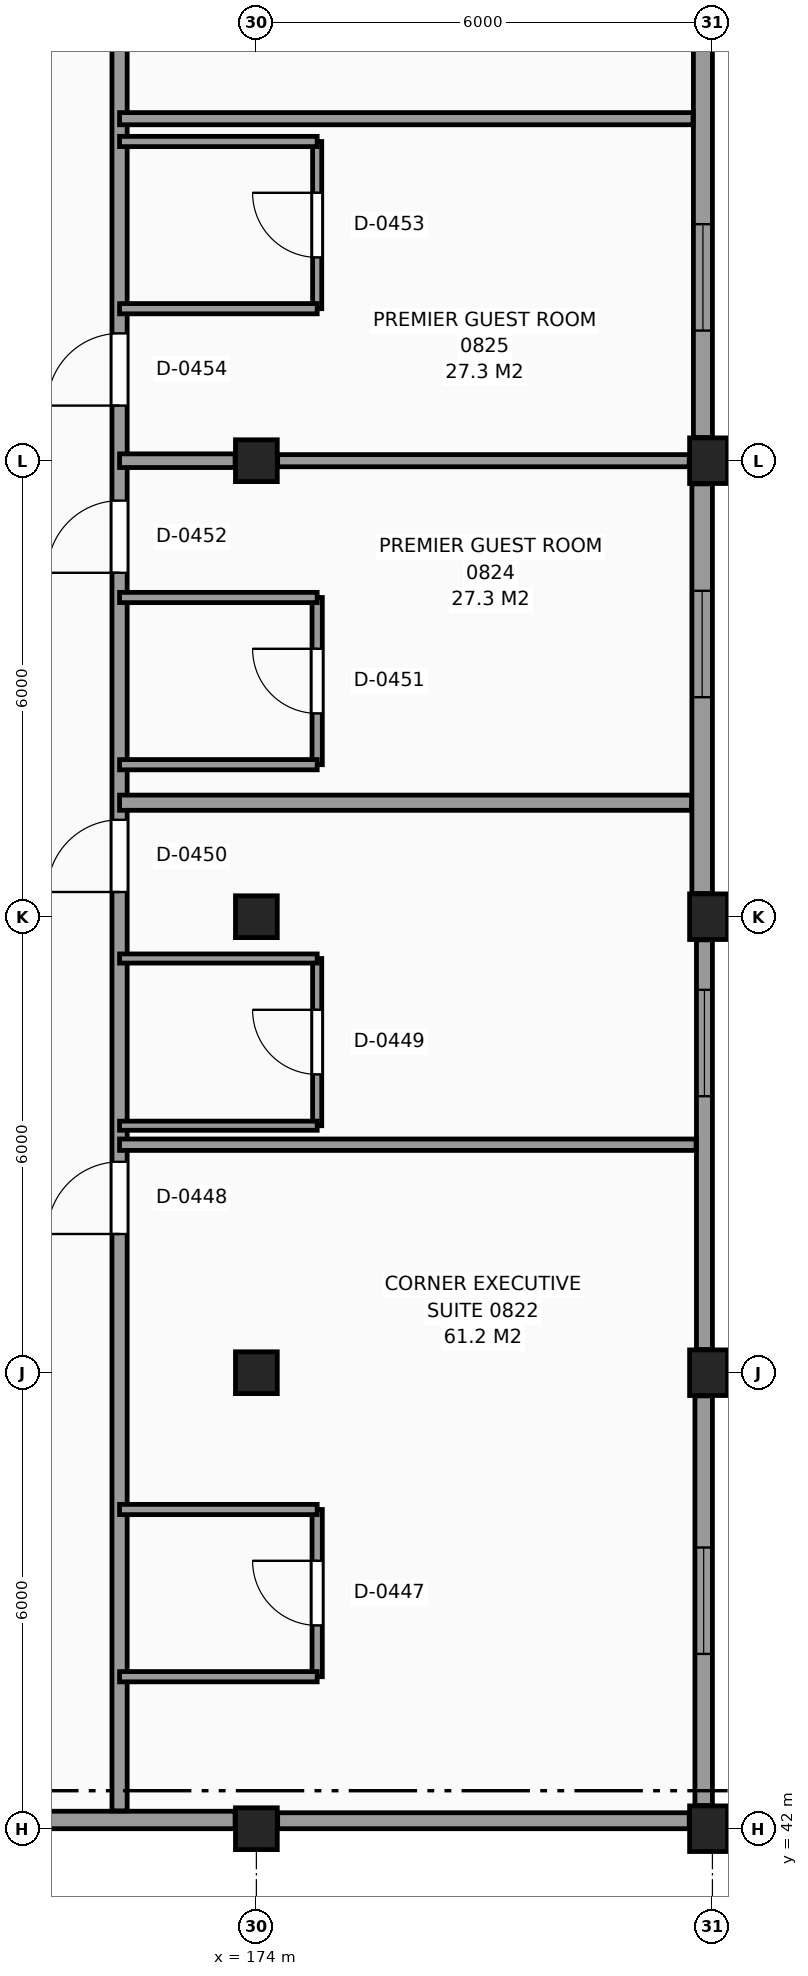
"""IFC4 building model, lengths in metres.
Left out: names, types, materials, properties, quantities, classifications, styles, units other than length and angle.
Written with IfcOpenShell. Run it as: python <this file> out.ifc"""

import sys

from ifc_helpers import new_model, si_unit, direction, frame, frame_2d, origin, origin_2d, place, context, subcontext, project, spatial, rectangle, extrude, element, fill, save


model = new_model("IFC4")
c1 = context("Model", 3, precision=1e-05, world=origin(), true_north=direction((0.0, 1.0)))
c2 = subcontext(c1, "Body", "Model", "MODEL_VIEW")
j1 = project(units=[si_unit("LENGTHUNIT", "METRE"), si_unit("PLANEANGLEUNIT", "RADIAN")], contexts=[c1])
p1 = place(None, origin())
s1 = spatial("IfcSite", under=j1, at=p1, CompositionType="ELEMENT")
p2 = place(p1, origin())
s2 = spatial("IfcBuilding", under=s1, at=p2, CompositionType="ELEMENT")
p3 = place(p2, frame((0.0, 0.0, 34.8)))
s3 = spatial("IfcBuildingStorey", under=s2, at=p3, CompositionType="ELEMENT", Elevation=34.8)
for number, where, z_axis, x_axis in (
    (1, (174.0, 42.0, 0.0), (0.0, 0.0, 1.0), (1.0, 0.0, 0.0)),
    (2, (174.0, 48.0, 0.0), (0.0, 0.0, 1.0), (1.0, 0.0, 0.0)),
    (3, (174.0, 54.0, 0.0), (0.0, 0.0, 1.0), (1.0, 0.0, 0.0)),
    (4, (174.0, 60.0, 0.0), (0.0, 0.0, 1.0), (1.0, 0.0, 0.0)),
):
    element("IfcColumn", number, at=place(p3, frame(where, z_axis=z_axis, x_axis=x_axis)), inside=s3, PredefinedType="COLUMN", context=c2, shape_type="SweptSolid", body=[
        extrude(rectangle(XDim=0.55, YDim=0.55, at=origin_2d()), origin(), (0.0, 0.0, 1.0), 3.3),
    ])
for number, where, z_axis, x_axis in (
    (5, (180.0, 42.0, 0.0), (0.0, 0.0, 1.0), (1.0, 0.0, 0.0)),
    (6, (180.0, 48.0, 0.0), (0.0, 0.0, 1.0), (1.0, 0.0, 0.0)),
    (7, (180.0, 54.0, 0.0), (0.0, 0.0, 1.0), (1.0, 0.0, 0.0)),
    (8, (180.0, 60.0, 0.0), (0.0, 0.0, 1.0), (1.0, 0.0, 0.0)),
):
    element("IfcColumn", number, at=place(p3, frame(where, z_axis=z_axis, x_axis=x_axis)), inside=s3, PredefinedType="COLUMN", context=c2, shape_type="SweptSolid", body=[
        extrude(rectangle(XDim=0.6, YDim=0.6, at=origin_2d()), origin(), (0.0, 0.0, 1.0), 3.3),
    ])
p4 = place(p3, frame((179.885, 42.305, 0.0), z_axis=(0.0, 0.0, 1.0), x_axis=(0.0, 1.0, 0.0)))
e9 = element("IfcWall", 9, at=p4, inside=s3, PredefinedType="SOLIDWALL", context=c2, shape_type="SweptSolid", body=[
    extrude(rectangle(XDim=5.39, YDim=0.23, at=frame_2d((2.695, 0.0))), origin(), (0.0, 0.0, 1.0), 2.42),
])
p5 = place(p4, frame((1.995, 0.0, 0.8)))
e10 = element("IfcOpeningElement", 10, at=p5, cuts=e9, PredefinedType="OPENING", context=c2, shape_type="SweptSolid", body=[
    extrude(rectangle(XDim=1.4, YDim=1.4, at=frame_2d((0.7, 0.7))), frame((0.0, 0.125, 0.0), z_axis=(0.0, -1.0, 0.0), x_axis=(1.0, 0.0, 0.0)), (0.0, 0.0, 1.0), 0.25),
])
p6 = place(p3, frame((179.895, 48.305, 0.0), z_axis=(0.0, 0.0, 1.0), x_axis=(0.0, 1.0, 0.0)))
e11 = element("IfcWall", 11, at=p6, inside=s3, PredefinedType="SOLIDWALL", context=c2, shape_type="SweptSolid", body=[
    extrude(rectangle(XDim=5.39, YDim=0.21, at=frame_2d((2.695, 0.0))), origin(), (0.0, 0.0, 1.0), 2.42),
])
p7 = place(p6, frame((3.333, 0.0, 0.8)))
e12 = element("IfcOpeningElement", 12, at=p7, cuts=e11, PredefinedType="OPENING", context=c2, shape_type="SweptSolid", body=[
    extrude(rectangle(XDim=1.4, YDim=1.4, at=frame_2d((0.7, 0.7))), frame((0.0, 0.115, 0.0), z_axis=(0.0, -1.0, 0.0), x_axis=(1.0, 0.0, 0.0)), (0.0, 0.0, 1.0), 0.23),
])
p8 = place(p3, frame((179.865, 54.305, 0.0), z_axis=(0.0, 0.0, 1.0), x_axis=(0.0, 1.0, 0.0)))
e13 = element("IfcWall", 13, at=p8, inside=s3, PredefinedType="SOLIDWALL", context=c2, shape_type="SweptSolid", body=[
    extrude(rectangle(XDim=5.39, YDim=0.27, at=frame_2d((2.695, 0.0))), origin(), (0.0, 0.0, 1.0), 2.42),
])
p9 = place(p8, frame((2.583, 0.0, 0.8)))
e14 = element("IfcOpeningElement", 14, at=p9, cuts=e13, PredefinedType="OPENING", context=c2, shape_type="SweptSolid", body=[
    extrude(rectangle(XDim=1.4, YDim=1.4, at=frame_2d((0.7, 0.7))), frame((0.0, 0.145, 0.0), z_axis=(0.0, -1.0, 0.0), x_axis=(1.0, 0.0, 0.0)), (0.0, 0.0, 1.0), 0.29),
])
p10 = place(p3, frame((179.875, 60.305, 0.0), z_axis=(0.0, 0.0, 1.0), x_axis=(0.0, 1.0, 0.0)))
e15 = element("IfcWall", 15, at=p10, inside=s3, PredefinedType="SOLIDWALL", context=c2, shape_type="SweptSolid", body=[
    extrude(rectangle(XDim=5.39, YDim=0.25, at=frame_2d((2.695, 0.0))), origin(), (0.0, 0.0, 1.0), 2.42),
])
p11 = place(p10, frame((1.407, 0.0, 0.8)))
e16 = element("IfcOpeningElement", 16, at=p11, cuts=e15, PredefinedType="OPENING", context=c2, shape_type="SweptSolid", body=[
    extrude(rectangle(XDim=1.4, YDim=1.4, at=frame_2d((0.7, 0.7))), frame((0.0, 0.135, 0.0), z_axis=(0.0, -1.0, 0.0), x_axis=(1.0, 0.0, 0.0)), (0.0, 0.0, 1.0), 0.27),
])
p12 = place(p3, frame((168.305, 42.115, 0.0), z_axis=(0.0, 0.0, 1.0), x_axis=(1.0, 0.0, 0.0)))
e17 = element("IfcWall", 17, at=p12, inside=s3, PredefinedType="SOLIDWALL", context=c2, shape_type="SweptSolid", body=[
    extrude(rectangle(XDim=5.415, YDim=0.23, at=frame_2d((2.708, 0.0))), origin(), (0.0, 0.0, 1.0), 2.27),
])
p13 = place(p3, frame((174.28, 42.105, 0.0), z_axis=(0.0, 0.0, 1.0), x_axis=(1.0, 0.0, 0.0)))
e18 = element("IfcWall", 18, at=p13, inside=s3, PredefinedType="SOLIDWALL", context=c2, shape_type="SweptSolid", body=[
    extrude(rectangle(XDim=5.415, YDim=0.21, at=frame_2d((2.708, 0.0))), origin(), (0.0, 0.0, 1.0), 2.27),
])
p14 = place(p3, frame((172.2, 42.235, 0.0), z_axis=(0.0, 0.0, 1.0), x_axis=(0.0, 1.0, 0.0)))
e19 = element("IfcWall", 19, at=p14, inside=s3, PredefinedType="PARTITIONING", context=c2, shape_type="SweptSolid", body=[
    extrude(rectangle(XDim=65.585, YDim=0.2, at=frame_2d((32.792, 0.0))), origin(), (0.0, 0.0, 1.0), 3.07),
])
p15 = place(p14, frame((7.59, 0.0, 0.0)))
e20 = element("IfcOpeningElement", 20, at=p15, cuts=e19, PredefinedType="OPENING", context=c2, shape_type="SweptSolid", body=[
    extrude(rectangle(XDim=0.95, YDim=2.1, at=frame_2d((0.475, 1.05))), frame((0.0, 0.11, 0.0), z_axis=(0.0, -1.0, 0.0), x_axis=(1.0, 0.0, 0.0)), (0.0, 0.0, 1.0), 0.22),
])
p16 = place(p14, frame((12.09, 0.0, 0.0)))
e21 = element("IfcOpeningElement", 21, at=p16, cuts=e19, PredefinedType="OPENING", context=c2, shape_type="SweptSolid", body=[
    extrude(rectangle(XDim=0.95, YDim=2.1, at=frame_2d((0.475, 1.05))), frame((0.0, 0.11, 0.0), z_axis=(0.0, -1.0, 0.0), x_axis=(1.0, 0.0, 0.0)), (0.0, 0.0, 1.0), 0.22),
])
p17 = place(p14, frame((16.29, 0.0, 0.0)))
e22 = element("IfcOpeningElement", 22, at=p17, cuts=e19, PredefinedType="OPENING", context=c2, shape_type="SweptSolid", body=[
    extrude(rectangle(XDim=0.95, YDim=2.1, at=frame_2d((0.475, 1.05))), frame((0.0, 0.11, 0.0), z_axis=(0.0, -1.0, 0.0), x_axis=(1.0, 0.0, 0.0)), (0.0, 0.0, 1.0), 0.22),
])
p18 = place(p14, frame((18.49, 0.0, 0.0)))
e23 = element("IfcOpeningElement", 23, at=p18, cuts=e19, PredefinedType="OPENING", context=c2, shape_type="SweptSolid", body=[
    extrude(rectangle(XDim=0.95, YDim=2.1, at=frame_2d((0.475, 1.05))), frame((0.0, 0.11, 0.0), z_axis=(0.0, -1.0, 0.0), x_axis=(1.0, 0.0, 0.0)), (0.0, 0.0, 1.0), 0.22),
])
p19 = place(p14, frame((24.49, 0.0, 0.0)))
e24 = element("IfcOpeningElement", 24, at=p19, cuts=e19, PredefinedType="OPENING", context=c2, shape_type="SweptSolid", body=[
    extrude(rectangle(XDim=0.95, YDim=2.1, at=frame_2d((0.475, 1.05))), frame((0.0, 0.11, 0.0), z_axis=(0.0, -1.0, 0.0), x_axis=(1.0, 0.0, 0.0)), (0.0, 0.0, 1.0), 0.22),
])
p20 = place(p14, frame((34.29, 0.0, 0.0)))
e25 = element("IfcOpeningElement", 25, at=p20, cuts=e19, PredefinedType="OPENING", context=c2, shape_type="SweptSolid", body=[
    extrude(rectangle(XDim=0.95, YDim=2.1, at=frame_2d((0.475, 1.05))), frame((0.0, 0.11, 0.0), z_axis=(0.0, -1.0, 0.0), x_axis=(1.0, 0.0, 0.0)), (0.0, 0.0, 1.0), 0.22),
])
p21 = place(p14, frame((36.49, 0.0, 0.0)))
e26 = element("IfcOpeningElement", 26, at=p21, cuts=e19, PredefinedType="OPENING", context=c2, shape_type="SweptSolid", body=[
    extrude(rectangle(XDim=0.95, YDim=2.1, at=frame_2d((0.475, 1.05))), frame((0.0, 0.11, 0.0), z_axis=(0.0, -1.0, 0.0), x_axis=(1.0, 0.0, 0.0)), (0.0, 0.0, 1.0), 0.22),
])
p22 = place(p14, frame((40.89, 0.0, 0.0)))
e27 = element("IfcOpeningElement", 27, at=p22, cuts=e19, PredefinedType="OPENING", context=c2, shape_type="SweptSolid", body=[
    extrude(rectangle(XDim=0.95, YDim=2.1, at=frame_2d((0.475, 1.05))), frame((0.0, 0.11, 0.0), z_axis=(0.0, -1.0, 0.0), x_axis=(1.0, 0.0, 0.0)), (0.0, 0.0, 1.0), 0.22),
])
p23 = place(p14, frame((45.39, 0.0, 0.0)))
e28 = element("IfcOpeningElement", 28, at=p23, cuts=e19, PredefinedType="OPENING", context=c2, shape_type="SweptSolid", body=[
    extrude(rectangle(XDim=0.95, YDim=2.1, at=frame_2d((0.475, 1.05))), frame((0.0, 0.11, 0.0), z_axis=(0.0, -1.0, 0.0), x_axis=(1.0, 0.0, 0.0)), (0.0, 0.0, 1.0), 0.22),
])
p24 = place(p14, frame((54.49, 0.0, 0.0)))
e29 = element("IfcOpeningElement", 29, at=p24, cuts=e19, PredefinedType="OPENING", context=c2, shape_type="SweptSolid", body=[
    extrude(rectangle(XDim=0.95, YDim=2.1, at=frame_2d((0.475, 1.05))), frame((0.0, 0.11, 0.0), z_axis=(0.0, -1.0, 0.0), x_axis=(1.0, 0.0, 0.0)), (0.0, 0.0, 1.0), 0.22),
])
p25 = place(p14, frame((60.49, 0.0, 0.0)))
e30 = element("IfcOpeningElement", 30, at=p25, cuts=e19, PredefinedType="OPENING", context=c2, shape_type="SweptSolid", body=[
    extrude(rectangle(XDim=0.95, YDim=2.1, at=frame_2d((0.475, 1.05))), frame((0.0, 0.11, 0.0), z_axis=(0.0, -1.0, 0.0), x_axis=(1.0, 0.0, 0.0)), (0.0, 0.0, 1.0), 0.22),
])
p26 = place(p3, frame((174.8, 44.0, 0.0), z_axis=(0.0, 0.0, 1.0), x_axis=(0.0, 1.0, 0.0)))
e31 = element("IfcWall", 31, at=p26, inside=s3, PredefinedType="PARTITIONING", context=c2, shape_type="SweptSolid", body=[
    extrude(rectangle(XDim=2.2, YDim=0.135, at=frame_2d((1.1, 0.0))), origin(), (0.0, 0.0, 1.0), 3.07),
])
p27 = place(p26, frame((0.675, 0.0, 0.0)))
e32 = element("IfcOpeningElement", 32, at=p27, cuts=e31, PredefinedType="OPENING", context=c2, shape_type="SweptSolid", body=[
    extrude(rectangle(XDim=0.85, YDim=2.1, at=frame_2d((0.425, 1.05))), frame((0.0, 0.078, 0.0), z_axis=(0.0, -1.0, 0.0), x_axis=(1.0, 0.0, 0.0)), (0.0, 0.0, 1.0), 0.155),
])
p28 = place(p3, frame((174.8, 51.25, 0.0), z_axis=(0.0, 0.0, 1.0), x_axis=(0.0, 1.0, 0.0)))
e33 = element("IfcWall", 33, at=p28, inside=s3, PredefinedType="PARTITIONING", context=c2, shape_type="SweptSolid", body=[
    extrude(rectangle(XDim=2.2, YDim=0.12, at=frame_2d((1.1, 0.0))), origin(), (0.0, 0.0, 1.0), 3.07),
])
p29 = place(p28, frame((0.675, 0.0, 0.0)))
e34 = element("IfcOpeningElement", 34, at=p29, cuts=e33, PredefinedType="OPENING", context=c2, shape_type="SweptSolid", body=[
    extrude(rectangle(XDim=0.85, YDim=2.1, at=frame_2d((0.425, 1.05))), frame((0.0, 0.07, 0.0), z_axis=(0.0, -1.0, 0.0), x_axis=(1.0, 0.0, 0.0)), (0.0, 0.0, 1.0), 0.14),
])
p30 = place(p3, frame((174.8, 56.0, 0.0), z_axis=(0.0, 0.0, 1.0), x_axis=(0.0, 1.0, 0.0)))
e35 = element("IfcWall", 35, at=p30, inside=s3, PredefinedType="PARTITIONING", context=c2, shape_type="SweptSolid", body=[
    extrude(rectangle(XDim=2.2, YDim=0.135, at=frame_2d((1.1, 0.0))), origin(), (0.0, 0.0, 1.0), 3.07),
])
p31 = place(p30, frame((0.675, 0.0, 0.0)))
e36 = element("IfcOpeningElement", 36, at=p31, cuts=e35, PredefinedType="OPENING", context=c2, shape_type="SweptSolid", body=[
    extrude(rectangle(XDim=0.85, YDim=2.1, at=frame_2d((0.425, 1.05))), frame((0.0, 0.078, 0.0), z_axis=(0.0, -1.0, 0.0), x_axis=(1.0, 0.0, 0.0)), (0.0, 0.0, 1.0), 0.155),
])
p32 = place(p3, frame((174.8, 62.0, 0.0), z_axis=(0.0, 0.0, 1.0), x_axis=(0.0, 1.0, 0.0)))
e37 = element("IfcWall", 37, at=p32, inside=s3, PredefinedType="PARTITIONING", context=c2, shape_type="SweptSolid", body=[
    extrude(rectangle(XDim=2.2, YDim=0.12, at=frame_2d((1.1, 0.0))), origin(), (0.0, 0.0, 1.0), 3.07),
])
p33 = place(p32, frame((0.675, 0.0, 0.0)))
e38 = element("IfcOpeningElement", 38, at=p33, cuts=e37, PredefinedType="OPENING", context=c2, shape_type="SweptSolid", body=[
    extrude(rectangle(XDim=0.85, YDim=2.1, at=frame_2d((0.425, 1.05))), frame((0.0, 0.07, 0.0), z_axis=(0.0, -1.0, 0.0), x_axis=(1.0, 0.0, 0.0)), (0.0, 0.0, 1.0), 0.14),
])
for number, where, z_axis, x_axis in (
    (39, (172.2, 44.0, 0.0), (0.0, 0.0, 1.0), (1.0, 0.0, 0.0)),
    (40, (172.2, 46.2, 0.0), (0.0, 0.0, 1.0), (1.0, 0.0, 0.0)),
):
    element("IfcWall", number, at=place(p3, frame(where, z_axis=z_axis, x_axis=x_axis)), inside=s3, PredefinedType="PARTITIONING", context=c2, shape_type="SweptSolid", body=[
        extrude(rectangle(XDim=2.6, YDim=0.135, at=frame_2d((1.3, 0.0))), origin(), (0.0, 0.0, 1.0), 3.07),
    ])
p34 = place(p3, frame((172.2, 51.0, 0.0), z_axis=(0.0, 0.0, 1.0), x_axis=(1.0, 0.0, 0.0)))
e41 = element("IfcWall", 41, at=p34, inside=s3, PredefinedType="PARTITIONING", context=c2, shape_type="SweptSolid", body=[
    extrude(rectangle(XDim=7.585, YDim=0.15, at=frame_2d((3.792, 0.0))), origin(), (0.0, 0.0, 1.0), 3.07),
])
for number, where, z_axis, x_axis in (
    (42, (172.2, 51.25, 0.0), (0.0, 0.0, 1.0), (1.0, 0.0, 0.0)),
    (43, (172.2, 53.45, 0.0), (0.0, 0.0, 1.0), (1.0, 0.0, 0.0)),
):
    element("IfcWall", number, at=place(p3, frame(where, z_axis=z_axis, x_axis=x_axis)), inside=s3, PredefinedType="PARTITIONING", context=c2, shape_type="SweptSolid", body=[
        extrude(rectangle(XDim=2.6, YDim=0.12, at=frame_2d((1.3, 0.0))), origin(), (0.0, 0.0, 1.0), 3.07),
    ])
p35 = place(p3, frame((172.2, 55.5, 0.0), z_axis=(0.0, 0.0, 1.0), x_axis=(1.0, 0.0, 0.0)))
e44 = element("IfcWall", 44, at=p35, inside=s3, PredefinedType="PARTITIONING", context=c2, shape_type="SweptSolid", body=[
    extrude(rectangle(XDim=7.525, YDim=0.2, at=frame_2d((3.763, 0.0))), origin(), (0.0, 0.0, 1.0), 3.07),
])
for number, where, z_axis, x_axis in (
    (45, (172.2, 56.0, 0.0), (0.0, 0.0, 1.0), (1.0, 0.0, 0.0)),
    (46, (172.2, 58.2, 0.0), (0.0, 0.0, 1.0), (1.0, 0.0, 0.0)),
):
    element("IfcWall", number, at=place(p3, frame(where, z_axis=z_axis, x_axis=x_axis)), inside=s3, PredefinedType="PARTITIONING", context=c2, shape_type="SweptSolid", body=[
        extrude(rectangle(XDim=2.6, YDim=0.135, at=frame_2d((1.3, 0.0))), origin(), (0.0, 0.0, 1.0), 3.07),
    ])
p36 = place(p3, frame((172.2, 60.0, 0.0), z_axis=(0.0, 0.0, 1.0), x_axis=(1.0, 0.0, 0.0)))
e47 = element("IfcWall", 47, at=p36, inside=s3, PredefinedType="PARTITIONING", context=c2, shape_type="SweptSolid", body=[
    extrude(rectangle(XDim=1.52, YDim=0.18, at=frame_2d((0.76, 0.0))), origin(), (0.0, 0.0, 1.0), 2.27),
])
p37 = place(p3, frame((174.28, 60.0, 0.0), z_axis=(0.0, 0.0, 1.0), x_axis=(1.0, 0.0, 0.0)))
e48 = element("IfcWall", 48, at=p37, inside=s3, PredefinedType="PARTITIONING", context=c2, shape_type="SweptSolid", body=[
    extrude(rectangle(XDim=5.415, YDim=0.16, at=frame_2d((2.708, 0.0))), origin(), (0.0, 0.0, 1.0), 2.27),
])
for number, where, z_axis, x_axis in (
    (49, (172.2, 62.0, 0.0), (0.0, 0.0, 1.0), (1.0, 0.0, 0.0)),
    (50, (172.2, 64.2, 0.0), (0.0, 0.0, 1.0), (1.0, 0.0, 0.0)),
):
    element("IfcWall", number, at=place(p3, frame(where, z_axis=z_axis, x_axis=x_axis)), inside=s3, PredefinedType="PARTITIONING", context=c2, shape_type="SweptSolid", body=[
        extrude(rectangle(XDim=2.6, YDim=0.135, at=frame_2d((1.3, 0.0))), origin(), (0.0, 0.0, 1.0), 3.07),
    ])
p38 = place(p3, frame((172.2, 64.5, 0.0), z_axis=(0.0, 0.0, 1.0), x_axis=(1.0, 0.0, 0.0)))
e51 = element("IfcWall", 51, at=p38, inside=s3, PredefinedType="PARTITIONING", context=c2, shape_type="SweptSolid", body=[
    extrude(rectangle(XDim=7.545, YDim=0.16, at=frame_2d((3.772, 0.0))), origin(), (0.0, 0.0, 1.0), 3.07),
])
p39 = place(p5, origin())
e52 = element("IfcWindow", 52, at=p39, inside=s3, PartitioningType="SINGLE_PANEL", PredefinedType="WINDOW", context=c2, shape_type="SweptSolid", body=[
    extrude(rectangle(XDim=1.4, YDim=1.4, at=frame_2d((0.7, 0.7))), frame((0.0, 0.03, 0.0), z_axis=(0.0, -1.0, 0.0), x_axis=(1.0, 0.0, 0.0)), (0.0, 0.0, 1.0), 0.06),
])
fill(e10, e52)
p40 = place(p7, origin())
e53 = element("IfcWindow", 53, at=p40, inside=s3, PartitioningType="SINGLE_PANEL", PredefinedType="WINDOW", context=c2, shape_type="SweptSolid", body=[
    extrude(rectangle(XDim=1.4, YDim=1.4, at=frame_2d((0.7, 0.7))), frame((0.0, 0.03, 0.0), z_axis=(0.0, -1.0, 0.0), x_axis=(1.0, 0.0, 0.0)), (0.0, 0.0, 1.0), 0.06),
])
fill(e12, e53)
p41 = place(p9, origin())
e54 = element("IfcWindow", 54, at=p41, inside=s3, PartitioningType="SINGLE_PANEL", PredefinedType="WINDOW", context=c2, shape_type="SweptSolid", body=[
    extrude(rectangle(XDim=1.4, YDim=1.4, at=frame_2d((0.7, 0.7))), frame((0.0, 0.03, 0.0), z_axis=(0.0, -1.0, 0.0), x_axis=(1.0, 0.0, 0.0)), (0.0, 0.0, 1.0), 0.06),
])
fill(e14, e54)
p42 = place(p11, origin())
e55 = element("IfcWindow", 55, at=p42, inside=s3, PartitioningType="SINGLE_PANEL", PredefinedType="WINDOW", context=c2, shape_type="SweptSolid", body=[
    extrude(rectangle(XDim=1.4, YDim=1.4, at=frame_2d((0.7, 0.7))), frame((0.0, 0.03, 0.0), z_axis=(0.0, -1.0, 0.0), x_axis=(1.0, 0.0, 0.0)), (0.0, 0.0, 1.0), 0.06),
])
fill(e16, e55)
p43 = place(p27, origin())
e56 = element("IfcDoor", 56, at=p43, inside=s3, OperationType="SINGLE_SWING_RIGHT", PredefinedType="DOOR", context=c2, shape_type="SweptSolid", body=[
    extrude(rectangle(XDim=0.85, YDim=2.1, at=frame_2d((0.425, 1.05))), frame((0.0, 0.025, 0.0), z_axis=(0.0, -1.0, 0.0), x_axis=(1.0, 0.0, 0.0)), (0.0, 0.0, 1.0), 0.05),
])
fill(e32, e56)
p44 = place(p15, origin())
e57 = element("IfcDoor", 57, at=p44, inside=s3, OperationType="SINGLE_SWING_LEFT", PredefinedType="DOOR", context=c2, shape_type="SweptSolid", body=[
    extrude(rectangle(XDim=0.95, YDim=2.1, at=frame_2d((0.475, 1.05))), frame((0.0, 0.025, 0.0), z_axis=(0.0, -1.0, 0.0), x_axis=(1.0, 0.0, 0.0)), (0.0, 0.0, 1.0), 0.05),
])
fill(e20, e57)
p45 = place(p29, origin())
e58 = element("IfcDoor", 58, at=p45, inside=s3, OperationType="SINGLE_SWING_RIGHT", PredefinedType="DOOR", context=c2, shape_type="SweptSolid", body=[
    extrude(rectangle(XDim=0.85, YDim=2.1, at=frame_2d((0.425, 1.05))), frame((0.0, 0.025, 0.0), z_axis=(0.0, -1.0, 0.0), x_axis=(1.0, 0.0, 0.0)), (0.0, 0.0, 1.0), 0.05),
])
fill(e34, e58)
p46 = place(p16, origin())
e59 = element("IfcDoor", 59, at=p46, inside=s3, OperationType="SINGLE_SWING_LEFT", PredefinedType="DOOR", context=c2, shape_type="SweptSolid", body=[
    extrude(rectangle(XDim=0.95, YDim=2.1, at=frame_2d((0.475, 1.05))), frame((0.0, 0.025, 0.0), z_axis=(0.0, -1.0, 0.0), x_axis=(1.0, 0.0, 0.0)), (0.0, 0.0, 1.0), 0.05),
])
fill(e21, e59)
p47 = place(p31, origin())
e60 = element("IfcDoor", 60, at=p47, inside=s3, OperationType="SINGLE_SWING_RIGHT", PredefinedType="DOOR", context=c2, shape_type="SweptSolid", body=[
    extrude(rectangle(XDim=0.85, YDim=2.1, at=frame_2d((0.425, 1.05))), frame((0.0, 0.025, 0.0), z_axis=(0.0, -1.0, 0.0), x_axis=(1.0, 0.0, 0.0)), (0.0, 0.0, 1.0), 0.05),
])
fill(e36, e60)
p48 = place(p17, origin())
e61 = element("IfcDoor", 61, at=p48, inside=s3, OperationType="SINGLE_SWING_LEFT", PredefinedType="DOOR", context=c2, shape_type="SweptSolid", body=[
    extrude(rectangle(XDim=0.95, YDim=2.1, at=frame_2d((0.475, 1.05))), frame((0.0, 0.025, 0.0), z_axis=(0.0, -1.0, 0.0), x_axis=(1.0, 0.0, 0.0)), (0.0, 0.0, 1.0), 0.05),
])
fill(e22, e61)
p49 = place(p33, origin())
e62 = element("IfcDoor", 62, at=p49, inside=s3, OperationType="SINGLE_SWING_RIGHT", PredefinedType="DOOR", context=c2, shape_type="SweptSolid", body=[
    extrude(rectangle(XDim=0.85, YDim=2.1, at=frame_2d((0.425, 1.05))), frame((0.0, 0.025, 0.0), z_axis=(0.0, -1.0, 0.0), x_axis=(1.0, 0.0, 0.0)), (0.0, 0.0, 1.0), 0.05),
])
fill(e38, e62)
p50 = place(p18, origin())
e63 = element("IfcDoor", 63, at=p50, inside=s3, OperationType="SINGLE_SWING_LEFT", PredefinedType="DOOR", context=c2, shape_type="SweptSolid", body=[
    extrude(rectangle(XDim=0.95, YDim=2.1, at=frame_2d((0.475, 1.05))), frame((0.0, 0.025, 0.0), z_axis=(0.0, -1.0, 0.0), x_axis=(1.0, 0.0, 0.0)), (0.0, 0.0, 1.0), 0.05),
])
fill(e23, e63)
save(model, sys.argv[1])
